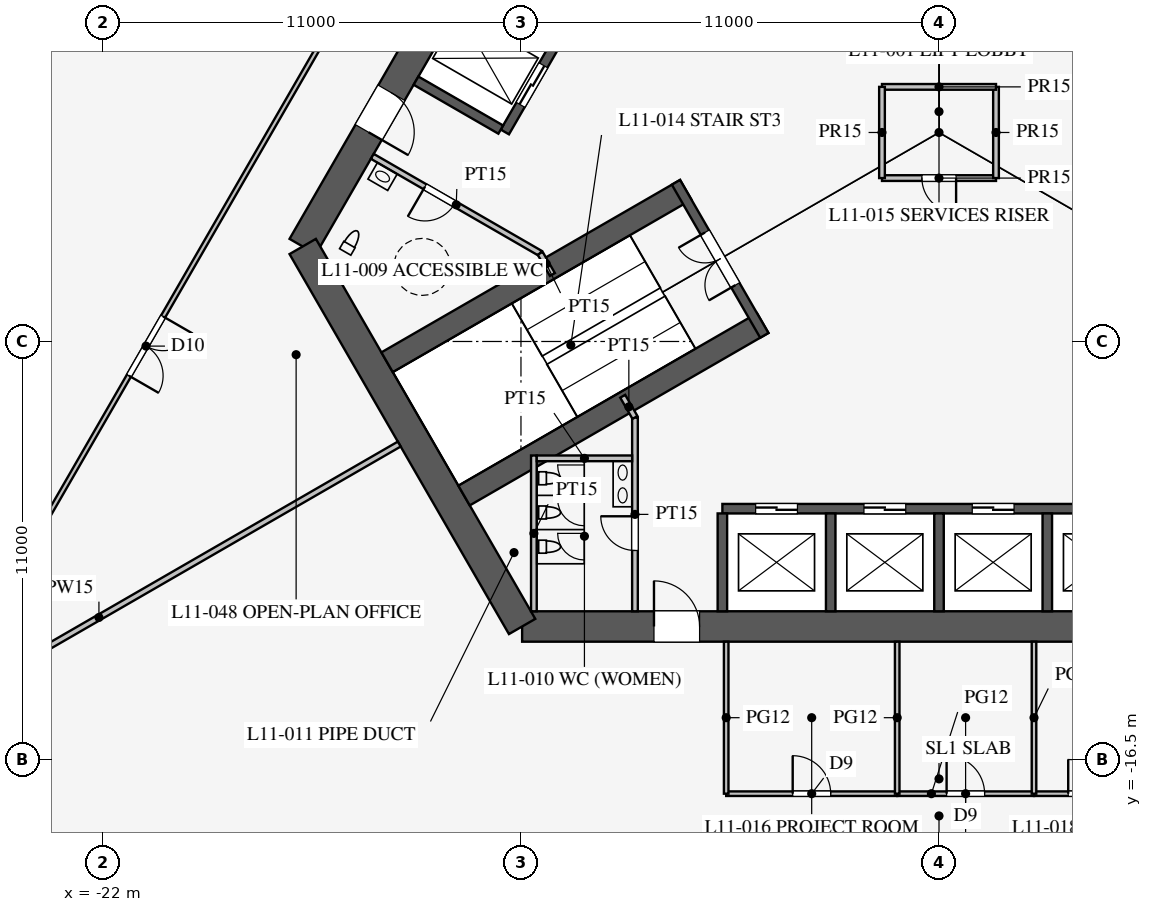
"""IFC4 building model, lengths in metres.
Left out: names, types, materials, properties, quantities, classifications, styles, units other than length and angle.
Written with IfcOpenShell. Run it as: python <this file> out.ifc"""

import sys

from ifc_helpers import new_model, si_unit, direction, frame, frame_2d, origin, place, context, subcontext, project, spatial, rectangle, extrude, element, fill, save


model = new_model("IFC4")
c1 = context("Model", 3, precision=1e-05, world=origin(), true_north=direction((0.0, 1.0)))
c2 = subcontext(c1, "Body", "Model", "MODEL_VIEW")
j1 = project(units=[si_unit("LENGTHUNIT", "METRE"), si_unit("PLANEANGLEUNIT", "RADIAN")], contexts=[c1])
p1 = place(None, origin())
s1 = spatial("IfcSite", under=j1, at=p1, CompositionType="ELEMENT")
p2 = place(p1, origin())
s2 = spatial("IfcBuilding", under=s1, at=p2, CompositionType="ELEMENT")
p3 = place(p2, frame((0.0, 0.0, 50.1)))
s3 = spatial("IfcBuildingStorey", under=s2, at=p3, CompositionType="ELEMENT", Elevation=50.1)
p4 = place(p3, frame((-10.97, -13.0, 0.0), z_axis=(0.0, 0.0, 1.0), x_axis=(1.0, 0.0, 0.0)))
e1 = element("IfcWall", 1, at=p4, inside=s3, PredefinedType="SHEAR", context=c2, shape_type="SweptSolid", body=[
    extrude(rectangle(XDim=21.939, YDim=0.8, at=frame_2d((10.97, 0.0))), origin(), (0.0, 0.0, 1.0), 4.2),
])
p5 = place(p4, frame((17.27, 0.0, 0.0)))
e2 = element("IfcOpeningElement", 2, at=p5, cuts=e1, PredefinedType="OPENING", context=c2, shape_type="SweptSolid", body=[
    extrude(rectangle(XDim=1.2, YDim=2.1, at=frame_2d((0.6, 1.05))), frame((0.0, 0.41, 0.0), z_axis=(0.0, -1.0, 0.0), x_axis=(1.0, 0.0, 0.0)), (0.0, 0.0, 1.0), 0.82),
])
p6 = place(p4, frame((3.47, 0.0, 0.0)))
e3 = element("IfcOpeningElement", 3, at=p6, cuts=e1, PredefinedType="OPENING", context=c2, shape_type="SweptSolid", body=[
    extrude(rectangle(XDim=1.2, YDim=2.1, at=frame_2d((0.6, 1.05))), frame((0.0, 0.41, 0.0), z_axis=(0.0, -1.0, 0.0), x_axis=(1.0, 0.0, 0.0)), (0.0, 0.0, 1.0), 0.82),
])
p7 = place(p3, frame((-5.773, 16.0, 0.0), z_axis=(0.0, 0.0, 1.0), x_axis=(-0.500002442456, -0.866023993627, 0.0)))
e4 = element("IfcWall", 4, at=p7, inside=s3, PredefinedType="SHEAR", context=c2, shape_type="SweptSolid", body=[
    extrude(rectangle(XDim=21.939, YDim=0.8, at=frame_2d((10.97, 0.0))), origin(), (0.0, 0.0, 1.0), 4.2),
])
p8 = place(p7, frame((17.27, 0.0, 0.0)))
e5 = element("IfcOpeningElement", 5, at=p8, cuts=e4, PredefinedType="OPENING", context=c2, shape_type="SweptSolid", body=[
    extrude(rectangle(XDim=1.2, YDim=2.1, at=frame_2d((0.6, 1.05))), frame((0.0, 0.41, 0.0), z_axis=(0.0, -1.0, 0.0), x_axis=(1.0, 0.0, 0.0)), (0.0, 0.0, 1.0), 0.82),
])
p9 = place(p7, frame((3.47, 0.0, 0.0)))
e6 = element("IfcOpeningElement", 6, at=p9, cuts=e4, PredefinedType="OPENING", context=c2, shape_type="SweptSolid", body=[
    extrude(rectangle(XDim=1.2, YDim=2.1, at=frame_2d((0.6, 1.05))), frame((0.0, 0.41, 0.0), z_axis=(0.0, -1.0, 0.0), x_axis=(1.0, 0.0, 0.0)), (0.0, 0.0, 1.0), 0.82),
])
p10 = place(p3, frame((-16.743, -3.0, 0.0), z_axis=(0.0, 0.0, 1.0), x_axis=(0.499995765644, -0.866027848477, 0.0)))
e7 = element("IfcWall", 7, at=p10, inside=s3, PredefinedType="SHEAR", context=c2, shape_type="SweptSolid", body=[
    extrude(rectangle(XDim=11.547, YDim=0.8, at=frame_2d((5.773, 0.0))), origin(), (0.0, 0.0, 1.0), 4.2),
])
p11 = place(p3, frame((-5.7, -9.9, 0.0), z_axis=(0.0, 0.0, 1.0), x_axis=(1.0, 0.0, 0.0)))
e8 = element("IfcWall", 8, at=p11, inside=s3, PredefinedType="SHEAR", context=c2, shape_type="SweptSolid", body=[
    extrude(rectangle(XDim=11.4, YDim=0.25, at=frame_2d((5.7, 0.0))), origin(), (0.0, 0.0, 1.0), 4.2),
])
p12 = place(p11, frame((0.875, 0.0, 0.0)))
e9 = element("IfcOpeningElement", 9, at=p12, cuts=e8, PredefinedType="OPENING", context=c2, shape_type="SweptSolid", body=[
    extrude(rectangle(XDim=1.1, YDim=2.2, at=frame_2d((0.55, 1.1))), frame((0.0, 0.135, 0.0), z_axis=(0.0, -1.0, 0.0), x_axis=(1.0, 0.0, 0.0)), (0.0, 0.0, 1.0), 0.27),
])
p13 = place(p11, frame((3.725, 0.0, 0.0)))
e10 = element("IfcOpeningElement", 10, at=p13, cuts=e8, PredefinedType="OPENING", context=c2, shape_type="SweptSolid", body=[
    extrude(rectangle(XDim=1.1, YDim=2.2, at=frame_2d((0.55, 1.1))), frame((0.0, 0.135, 0.0), z_axis=(0.0, -1.0, 0.0), x_axis=(1.0, 0.0, 0.0)), (0.0, 0.0, 1.0), 0.27),
])
p14 = place(p11, frame((6.575, 0.0, 0.0)))
e11 = element("IfcOpeningElement", 11, at=p14, cuts=e8, PredefinedType="OPENING", context=c2, shape_type="SweptSolid", body=[
    extrude(rectangle(XDim=1.1, YDim=2.2, at=frame_2d((0.55, 1.1))), frame((0.0, 0.135, 0.0), z_axis=(0.0, -1.0, 0.0), x_axis=(1.0, 0.0, 0.0)), (0.0, 0.0, 1.0), 0.27),
])
p15 = place(p11, frame((9.425, 0.0, 0.0)))
e12 = element("IfcOpeningElement", 12, at=p15, cuts=e8, PredefinedType="OPENING", context=c2, shape_type="SweptSolid", body=[
    extrude(rectangle(XDim=1.1, YDim=2.2, at=frame_2d((0.55, 1.1))), frame((0.0, 0.135, 0.0), z_axis=(0.0, -1.0, 0.0), x_axis=(1.0, 0.0, 0.0)), (0.0, 0.0, 1.0), 0.27),
])
for number, where, z_axis, x_axis in (
    (13, (-5.7, -10.025, 0.0), (0.0, 0.0, 1.0), (0.0, -1.0, 0.0)),
    (14, (-2.85, -10.025, 0.0), (0.0, 0.0, 1.0), (0.0, -1.0, 0.0)),
    (15, (0.0, -10.025, 0.0), (0.0, 0.0, 1.0), (0.0, -1.0, 0.0)),
    (16, (2.85, -10.025, 0.0), (0.0, 0.0, 1.0), (0.0, -1.0, 0.0)),
):
    element("IfcWall", number, at=place(p3, frame(where, z_axis=z_axis, x_axis=x_axis)), inside=s3, PredefinedType="SHEAR", context=c2, shape_type="SweptSolid", body=[
        extrude(rectangle(XDim=2.575, YDim=0.25, at=frame_2d((1.288, 0.0))), origin(), (0.0, 0.0, 1.0), 4.2),
    ])
p16 = place(p3, frame((-5.724, 9.886, 0.0), z_axis=(0.0, 0.0, 1.0), x_axis=(-0.500001763848, -0.866024385424, 0.0)))
e17 = element("IfcWall", 17, at=p16, inside=s3, PredefinedType="SHEAR", context=c2, shape_type="SweptSolid", body=[
    extrude(rectangle(XDim=11.4, YDim=0.25, at=frame_2d((5.7, 0.0))), origin(), (0.0, 0.0, 1.0), 4.2),
])
p17 = place(p16, frame((6.525, 0.0, 0.0)))
e18 = element("IfcOpeningElement", 18, at=p17, cuts=e17, PredefinedType="OPENING", context=c2, shape_type="SweptSolid", body=[
    extrude(rectangle(XDim=1.2, YDim=2.2, at=frame_2d((0.6, 1.1))), frame((0.0, 0.135, 0.0), z_axis=(0.0, -1.0, 0.0), x_axis=(1.0, 0.0, 0.0)), (0.0, 0.0, 1.0), 0.27),
])
p18 = place(p16, frame((9.375, 0.0, 0.0)))
e19 = element("IfcOpeningElement", 19, at=p18, cuts=e17, PredefinedType="OPENING", context=c2, shape_type="SweptSolid", body=[
    extrude(rectangle(XDim=1.2, YDim=2.2, at=frame_2d((0.6, 1.1))), frame((0.0, 0.135, 0.0), z_axis=(0.0, -1.0, 0.0), x_axis=(1.0, 0.0, 0.0)), (0.0, 0.0, 1.0), 0.27),
])
p19 = place(p3, frame((-11.532, 0.076, 0.0), z_axis=(0.0, 0.0, 1.0), x_axis=(-0.866005588531, 0.500034319456, 0.0)))
e20 = element("IfcWall", 20, at=p19, inside=s3, PredefinedType="SHEAR", context=c2, shape_type="SweptSolid", body=[
    extrude(rectangle(XDim=2.575, YDim=0.25, at=frame_2d((1.288, 0.0))), origin(), (0.0, 0.0, 1.0), 4.2),
])
for number, where, z_axis, x_axis in (
    (21, (-6.663, -1.509, 0.0), (0.0, 0.0, 1.0), (-0.866, -0.5, 0.0)),
    (22, (-4.638, -5.016, 0.0), (0.0, 0.0, 1.0), (-0.866, -0.5, 0.0)),
):
    element("IfcWall", number, at=place(p3, frame(where, z_axis=z_axis, x_axis=x_axis)), inside=s3, PredefinedType="SHEAR", context=c2, shape_type="SweptSolid", body=[
        extrude(rectangle(XDim=9.075, YDim=0.6, at=frame_2d((4.538, 0.0))), origin(), (0.0, 0.0, 1.0), 4.2),
    ])
p20 = place(p3, frame((-6.922, -1.312, 0.0), z_axis=(0.0, 0.0, 1.0), x_axis=(0.499984536904, -0.866034331223, 0.0)))
e23 = element("IfcWall", 23, at=p20, inside=s3, PredefinedType="SHEAR", context=c2, shape_type="SweptSolid", body=[
    extrude(rectangle(XDim=4.65, YDim=0.25, at=frame_2d((2.325, 0.0))), origin(), (0.0, 0.0, 1.0), 4.2),
])
p21 = place(p20, frame((1.525, 0.0, 0.0)))
e24 = element("IfcOpeningElement", 24, at=p21, cuts=e23, PredefinedType="OPENING", context=c2, shape_type="SweptSolid", body=[
    extrude(rectangle(XDim=1.6, YDim=2.1, at=frame_2d((0.8, 1.05))), frame((0.0, 0.135, 0.0), z_axis=(0.0, -1.0, 0.0), x_axis=(1.0, 0.0, 0.0)), (0.0, 0.0, 1.0), 0.27),
])
p22 = place(p3, frame((-8.0, -7.5, 0.0), z_axis=(0.0, 0.0, 1.0), x_axis=(0.0, -1.0, 0.0)))
e25 = element("IfcWall", 25, at=p22, inside=s3, PredefinedType="PARTITIONING", context=c2, shape_type="SweptSolid", body=[
    extrude(rectangle(XDim=5.1, YDim=0.15, at=frame_2d((2.55, 0.0))), origin(), (0.0, 0.0, 1.0), 4.0),
])
p23 = place(p22, frame((2.6, 0.0, 0.0)))
e26 = element("IfcOpeningElement", 26, at=p23, cuts=e25, PredefinedType="OPENING", context=c2, shape_type="SweptSolid", body=[
    extrude(rectangle(XDim=0.9, YDim=2.1, at=frame_2d((0.45, 1.05))), frame((0.0, 0.085, 0.0), z_axis=(0.0, -1.0, 0.0), x_axis=(1.0, 0.0, 0.0)), (0.0, 0.0, 1.0), 0.17),
])
p24 = place(p3, frame((-10.495, -3.178, 0.0), z_axis=(0.0, 0.0, 1.0), x_axis=(-0.86602216432, 0.500005610874, 0.0)))
e27 = element("IfcWall", 27, at=p24, inside=s3, PredefinedType="PARTITIONING", context=c2, shape_type="SweptSolid", body=[
    extrude(rectangle(XDim=5.1, YDim=0.15, at=frame_2d((2.55, 0.0))), origin(), (0.0, 0.0, 1.0), 4.0),
])
p25 = place(p24, frame((2.6, 0.0, 0.0)))
e28 = element("IfcOpeningElement", 28, at=p25, cuts=e27, PredefinedType="OPENING", context=c2, shape_type="SweptSolid", body=[
    extrude(rectangle(XDim=0.9, YDim=2.1, at=frame_2d((0.45, 1.05))), frame((0.0, 0.085, 0.0), z_axis=(0.0, -1.0, 0.0), x_axis=(1.0, 0.0, 0.0)), (0.0, 0.0, 1.0), 0.17),
])
for number, where, z_axis, x_axis in (
    (29, (-10.495, -3.178, 0.0), (0.0, 0.0, 1.0), (0.5, -0.866, 0.0)),
    (30, (-8.0, -7.5, 0.0), (0.0, 0.0, 1.0), (-0.5, 0.866, 0.0)),
):
    element("IfcWall", number, at=place(p3, frame(where, z_axis=z_axis, x_axis=x_axis)), inside=s3, PredefinedType="PARTITIONING", context=c2, shape_type="SweptSolid", body=[
        extrude(rectangle(XDim=0.645, YDim=0.15, at=frame_2d((0.323, 0.0))), origin(), (0.0, 0.0, 1.0), 4.0),
    ])
p26 = place(p3, frame((-10.66, -8.5, 0.0), z_axis=(0.0, 0.0, 1.0), x_axis=(0.0, -1.0, 0.0)))
e31 = element("IfcWall", 31, at=p26, inside=s3, PredefinedType="PARTITIONING", context=c2, shape_type="SweptSolid", body=[
    extrude(rectangle(XDim=4.1, YDim=0.15, at=frame_2d((2.05, 0.0))), origin(), (0.0, 0.0, 1.0), 4.0),
])
p27 = place(p3, frame((-8.075, -8.575, 0.0), z_axis=(0.0, 0.0, 1.0), x_axis=(-1.0, 0.0, 0.0)))
e32 = element("IfcWall", 32, at=p27, inside=s3, PredefinedType="PARTITIONING", context=c2, shape_type="SweptSolid", body=[
    extrude(rectangle(XDim=2.51, YDim=0.15, at=frame_2d((1.255, 0.0))), origin(), (0.0, 0.0, 1.0), 4.0),
])
p28 = place(p3, frame((-1.5, -1.2, 0.0), z_axis=(0.0, 0.0, 1.0), x_axis=(1.0, 0.0, 0.0)))
e33 = element("IfcWall", 33, at=p28, inside=s3, PredefinedType="PARTITIONING", context=c2, shape_type="SweptSolid", body=[
    extrude(rectangle(XDim=3.0, YDim=0.15, at=frame_2d((1.5, 0.0))), origin(), (0.0, 0.0, 1.0), 4.0),
])
p29 = place(p28, frame((1.05, 0.0, 0.0)))
e34 = element("IfcOpeningElement", 34, at=p29, cuts=e33, PredefinedType="OPENING", context=c2, shape_type="SweptSolid", body=[
    extrude(rectangle(XDim=0.9, YDim=2.1, at=frame_2d((0.45, 1.05))), frame((0.0, 0.085, 0.0), z_axis=(0.0, -1.0, 0.0), x_axis=(1.0, 0.0, 0.0)), (0.0, 0.0, 1.0), 0.17),
])
p30 = place(p3, frame((1.5, -1.2, 0.0), z_axis=(0.0, 0.0, 1.0), x_axis=(0.0, 1.0, 0.0)))
e35 = element("IfcWall", 35, at=p30, inside=s3, PredefinedType="PARTITIONING", context=c2, shape_type="SweptSolid", body=[
    extrude(rectangle(XDim=2.4, YDim=0.15, at=frame_2d((1.2, 0.0))), origin(), (0.0, 0.0, 1.0), 4.0),
])
p31 = place(p3, frame((1.5, 1.2, 0.0), z_axis=(0.0, 0.0, 1.0), x_axis=(-1.0, 0.0, 0.0)))
e36 = element("IfcWall", 36, at=p31, inside=s3, PredefinedType="PARTITIONING", context=c2, shape_type="SweptSolid", body=[
    extrude(rectangle(XDim=3.0, YDim=0.15, at=frame_2d((1.5, 0.0))), origin(), (0.0, 0.0, 1.0), 4.0),
])
p32 = place(p3, frame((-1.5, 1.2, 0.0), z_axis=(0.0, 0.0, 1.0), x_axis=(0.0, -1.0, 0.0)))
e37 = element("IfcWall", 37, at=p32, inside=s3, PredefinedType="PARTITIONING", context=c2, shape_type="SweptSolid", body=[
    extrude(rectangle(XDim=2.4, YDim=0.15, at=frame_2d((1.2, 0.0))), origin(), (0.0, 0.0, 1.0), 4.0),
])
p33 = place(p3, frame((-14.203, -8.2, 0.0), z_axis=(0.0, 0.0, 1.0), x_axis=(-0.866024965723, -0.500000758745, 0.0)))
e38 = element("IfcWall", 38, at=p33, inside=s3, PredefinedType="PARTITIONING", context=c2, shape_type="SweptSolid", body=[
    extrude(rectangle(XDim=18.25, YDim=0.15, at=frame_2d((9.125, 0.0))), origin(), (0.0, 0.0, 1.0), 2.3),
])
p34 = place(p3, frame((2.5, -17.4, 0.0), z_axis=(0.0, 0.0, 1.0), x_axis=(1.0, 0.0, 0.0)))
e39 = element("IfcWall", 39, at=p34, inside=s3, PredefinedType="PARTITIONING", context=c2, shape_type="SweptSolid", body=[
    extrude(rectangle(XDim=2.7, YDim=0.12, at=frame_2d((1.35, 0.0))), origin(), (0.0, 0.0, 1.0), 2.9),
])
p35 = place(p34, frame((0.9, 0.0, 0.15)))
e40 = element("IfcOpeningElement", 40, at=p35, cuts=e39, PredefinedType="OPENING", context=c2, shape_type="SweptSolid", body=[
    extrude(rectangle(XDim=0.9, YDim=2.1, at=frame_2d((0.45, 1.05))), frame((0.0, 0.07, 0.0), z_axis=(0.0, -1.0, 0.0), x_axis=(1.0, 0.0, 0.0)), (0.0, 0.0, 1.0), 0.14),
])
p36 = place(p3, frame((-1.1, -17.4, 0.0), z_axis=(0.0, 0.0, 1.0), x_axis=(1.0, 0.0, 0.0)))
e41 = element("IfcWall", 41, at=p36, inside=s3, PredefinedType="PARTITIONING", context=c2, shape_type="SweptSolid", body=[
    extrude(rectangle(XDim=3.6, YDim=0.12, at=frame_2d((1.8, 0.0))), origin(), (0.0, 0.0, 1.0), 2.9),
])
p37 = place(p36, frame((1.3, 0.0, 0.15)))
e42 = element("IfcOpeningElement", 42, at=p37, cuts=e41, PredefinedType="OPENING", context=c2, shape_type="SweptSolid", body=[
    extrude(rectangle(XDim=1.0, YDim=2.1, at=frame_2d((0.5, 1.05))), frame((0.0, 0.07, 0.0), z_axis=(0.0, -1.0, 0.0), x_axis=(1.0, 0.0, 0.0)), (0.0, 0.0, 1.0), 0.14),
])
p38 = place(p3, frame((-5.6, -17.4, 0.0), z_axis=(0.0, 0.0, 1.0), x_axis=(1.0, 0.0, 0.0)))
e43 = element("IfcWall", 43, at=p38, inside=s3, PredefinedType="PARTITIONING", context=c2, shape_type="SweptSolid", body=[
    extrude(rectangle(XDim=4.5, YDim=0.12, at=frame_2d((2.25, 0.0))), origin(), (0.0, 0.0, 1.0), 2.9),
])
p39 = place(p38, frame((1.75, 0.0, 0.15)))
e44 = element("IfcOpeningElement", 44, at=p39, cuts=e43, PredefinedType="OPENING", context=c2, shape_type="SweptSolid", body=[
    extrude(rectangle(XDim=1.0, YDim=2.1, at=frame_2d((0.5, 1.05))), frame((0.0, 0.07, 0.0), z_axis=(0.0, -1.0, 0.0), x_axis=(1.0, 0.0, 0.0)), (0.0, 0.0, 1.0), 0.14),
])
for number, where, z_axis, x_axis in (
    (45, (2.5, -13.4, 0.0), (0.0, 0.0, 1.0), (0.0, -1.0, 0.0)),
    (46, (-1.1, -13.4, 0.0), (0.0, 0.0, 1.0), (0.0, -1.0, 0.0)),
    (47, (-5.6, -13.4, 0.0), (0.0, 0.0, 1.0), (0.0, -1.0, 0.0)),
):
    element("IfcWall", number, at=place(p3, frame(where, z_axis=z_axis, x_axis=x_axis)), inside=s3, PredefinedType="PARTITIONING", context=c2, shape_type="SweptSolid", body=[
        extrude(rectangle(XDim=4.0, YDim=0.12, at=frame_2d((2.0, 0.0))), origin(), (0.0, 0.0, 1.0), 2.9),
    ])
p40 = place(p3, frame((-0.016, 30.491, 0.0), z_axis=(0.0, 0.0, 1.0), x_axis=(-0.50000091641, -0.866024874695, 0.0)))
e48 = element("IfcWall", 48, at=p40, inside=s3, PredefinedType="PARTITIONING", context=c2, shape_type="SweptSolid", body=[
    extrude(rectangle(XDim=52.796, YDim=0.12, at=frame_2d((26.398, 0.0))), origin(), (0.0, 0.0, 1.0), 2.9),
])
p41 = place(p40, frame((10.2, 0.0, 0.15)))
e49 = element("IfcOpeningElement", 49, at=p41, cuts=e48, PredefinedType="OPENING", context=c2, shape_type="SweptSolid", body=[
    extrude(rectangle(XDim=1.8, YDim=2.1, at=frame_2d((0.9, 1.05))), frame((0.0, 0.07, 0.0), z_axis=(0.0, -1.0, 0.0), x_axis=(1.0, 0.0, 0.0)), (0.0, 0.0, 1.0), 0.14),
])
p42 = place(p40, frame((40.8, 0.0, 0.15)))
e50 = element("IfcOpeningElement", 50, at=p42, cuts=e48, PredefinedType="OPENING", context=c2, shape_type="SweptSolid", body=[
    extrude(rectangle(XDim=1.8, YDim=2.1, at=frame_2d((0.9, 1.05))), frame((0.0, 0.07, 0.0), z_axis=(0.0, -1.0, 0.0), x_axis=(1.0, 0.0, 0.0)), (0.0, 0.0, 1.0), 0.14),
])
p43 = place(p23, frame((0.9, 0.0, 0.0), z_axis=(0.0, 0.0, 1.0), x_axis=(-1.0, 0.0, 0.0)))
e51 = element("IfcDoor", 51, at=p43, inside=s3, OperationType="SINGLE_SWING_RIGHT", PredefinedType="DOOR", context=c2, shape_type="SweptSolid", body=[
    extrude(rectangle(XDim=0.9, YDim=2.1, at=frame_2d((0.45, 1.05))), frame((0.0, 0.025, 0.0), z_axis=(0.0, -1.0, 0.0), x_axis=(1.0, 0.0, 0.0)), (0.0, 0.0, 1.0), 0.05),
])
fill(e26, e51)
p44 = place(p25, origin())
e52 = element("IfcDoor", 52, at=p44, inside=s3, OperationType="SINGLE_SWING_RIGHT", PredefinedType="DOOR", context=c2, shape_type="SweptSolid", body=[
    extrude(rectangle(XDim=0.9, YDim=2.1, at=frame_2d((0.45, 1.05))), frame((0.0, 0.025, 0.0), z_axis=(0.0, -1.0, 0.0), x_axis=(1.0, 0.0, 0.0)), (0.0, 0.0, 1.0), 0.05),
])
fill(e28, e52)
p45 = place(p29, frame((0.9, 0.0, 0.0), z_axis=(0.0, 0.0, 1.0), x_axis=(-1.0, 0.0, 0.0)))
e53 = element("IfcDoor", 53, at=p45, inside=s3, OperationType="SINGLE_SWING_LEFT", PredefinedType="DOOR", context=c2, shape_type="SweptSolid", body=[
    extrude(rectangle(XDim=0.9, YDim=2.1, at=frame_2d((0.45, 1.05))), frame((0.0, 0.025, 0.0), z_axis=(0.0, -1.0, 0.0), x_axis=(1.0, 0.0, 0.0)), (0.0, 0.0, 1.0), 0.05),
])
fill(e34, e53)
p46 = place(p21, frame((1.6, 0.0, 0.0), z_axis=(0.0, 0.0, 1.0), x_axis=(-1.0, 0.0, 0.0)))
e54 = element("IfcDoor", 54, at=p46, inside=s3, OperationType="DOUBLE_DOOR_SINGLE_SWING", PredefinedType="DOOR", context=c2, shape_type="SweptSolid", body=[
    extrude(rectangle(XDim=1.6, YDim=2.1, at=frame_2d((0.8, 1.05))), frame((0.0, 0.025, 0.0), z_axis=(0.0, -1.0, 0.0), x_axis=(1.0, 0.0, 0.0)), (0.0, 0.0, 1.0), 0.05),
])
fill(e24, e54)
p47 = place(p6, origin())
e55 = element("IfcDoor", 55, at=p47, inside=s3, OperationType="SINGLE_SWING_LEFT", PredefinedType="DOOR", context=c2, shape_type="SweptSolid", body=[
    extrude(rectangle(XDim=1.2, YDim=2.1, at=frame_2d((0.6, 1.05))), frame((0.0, 0.025, 0.0), z_axis=(0.0, -1.0, 0.0), x_axis=(1.0, 0.0, 0.0)), (0.0, 0.0, 1.0), 0.05),
])
fill(e3, e55)
p48 = place(p8, origin())
e56 = element("IfcDoor", 56, at=p48, inside=s3, OperationType="SINGLE_SWING_RIGHT", PredefinedType="DOOR", context=c2, shape_type="SweptSolid", body=[
    extrude(rectangle(XDim=1.2, YDim=2.1, at=frame_2d((0.6, 1.05))), frame((0.0, 0.025, 0.0), z_axis=(0.0, -1.0, 0.0), x_axis=(1.0, 0.0, 0.0)), (0.0, 0.0, 1.0), 0.05),
])
fill(e5, e56)
p49 = place(p39, origin())
e57 = element("IfcDoor", 57, at=p49, inside=s3, OperationType="SINGLE_SWING_LEFT", PredefinedType="DOOR", context=c2, shape_type="SweptSolid", body=[
    extrude(rectangle(XDim=1.0, YDim=2.1, at=frame_2d((0.5, 1.05))), frame((0.0, 0.025, 0.0), z_axis=(0.0, -1.0, 0.0), x_axis=(1.0, 0.0, 0.0)), (0.0, 0.0, 1.0), 0.05),
])
fill(e44, e57)
p50 = place(p37, origin())
e58 = element("IfcDoor", 58, at=p50, inside=s3, OperationType="SINGLE_SWING_LEFT", PredefinedType="DOOR", context=c2, shape_type="SweptSolid", body=[
    extrude(rectangle(XDim=1.0, YDim=2.1, at=frame_2d((0.5, 1.05))), frame((0.0, 0.025, 0.0), z_axis=(0.0, -1.0, 0.0), x_axis=(1.0, 0.0, 0.0)), (0.0, 0.0, 1.0), 0.05),
])
fill(e42, e58)
p51 = place(p35, origin())
e59 = element("IfcDoor", 59, at=p51, inside=s3, OperationType="SINGLE_SWING_LEFT", PredefinedType="DOOR", context=c2, shape_type="SweptSolid", body=[
    extrude(rectangle(XDim=0.9, YDim=2.1, at=frame_2d((0.45, 1.05))), frame((0.0, 0.025, 0.0), z_axis=(0.0, -1.0, 0.0), x_axis=(1.0, 0.0, 0.0)), (0.0, 0.0, 1.0), 0.05),
])
fill(e40, e59)
p52 = place(p42, origin())
e60 = element("IfcDoor", 60, at=p52, inside=s3, OperationType="DOUBLE_DOOR_SINGLE_SWING", PredefinedType="DOOR", context=c2, shape_type="SweptSolid", body=[
    extrude(rectangle(XDim=1.8, YDim=2.1, at=frame_2d((0.9, 1.05))), frame((0.0, 0.025, 0.0), z_axis=(0.0, -1.0, 0.0), x_axis=(1.0, 0.0, 0.0)), (0.0, 0.0, 1.0), 0.05),
])
fill(e50, e60)
p53 = place(p12, origin())
e61 = element("IfcDoor", 61, at=p53, inside=s3, OperationType="DOUBLE_DOOR_SLIDING", PredefinedType="DOOR", context=c2, shape_type="SweptSolid", body=[
    extrude(rectangle(XDim=1.1, YDim=2.2, at=frame_2d((0.55, 1.1))), frame((0.0, 0.025, 0.0), z_axis=(0.0, -1.0, 0.0), x_axis=(1.0, 0.0, 0.0)), (0.0, 0.0, 1.0), 0.05),
])
fill(e9, e61)
p54 = place(p13, origin())
e62 = element("IfcDoor", 62, at=p54, inside=s3, OperationType="DOUBLE_DOOR_SLIDING", PredefinedType="DOOR", context=c2, shape_type="SweptSolid", body=[
    extrude(rectangle(XDim=1.1, YDim=2.2, at=frame_2d((0.55, 1.1))), frame((0.0, 0.025, 0.0), z_axis=(0.0, -1.0, 0.0), x_axis=(1.0, 0.0, 0.0)), (0.0, 0.0, 1.0), 0.05),
])
fill(e10, e62)
p55 = place(p14, origin())
e63 = element("IfcDoor", 63, at=p55, inside=s3, OperationType="DOUBLE_DOOR_SLIDING", PredefinedType="DOOR", context=c2, shape_type="SweptSolid", body=[
    extrude(rectangle(XDim=1.1, YDim=2.2, at=frame_2d((0.55, 1.1))), frame((0.0, 0.025, 0.0), z_axis=(0.0, -1.0, 0.0), x_axis=(1.0, 0.0, 0.0)), (0.0, 0.0, 1.0), 0.05),
])
fill(e11, e63)
p56 = place(p18, origin())
e64 = element("IfcDoor", 64, at=p56, inside=s3, OperationType="DOUBLE_DOOR_SLIDING", PredefinedType="DOOR", context=c2, shape_type="SweptSolid", body=[
    extrude(rectangle(XDim=1.2, YDim=2.2, at=frame_2d((0.6, 1.1))), frame((0.0, 0.025, 0.0), z_axis=(0.0, -1.0, 0.0), x_axis=(1.0, 0.0, 0.0)), (0.0, 0.0, 1.0), 0.05),
])
fill(e19, e64)
save(model, sys.argv[1])
